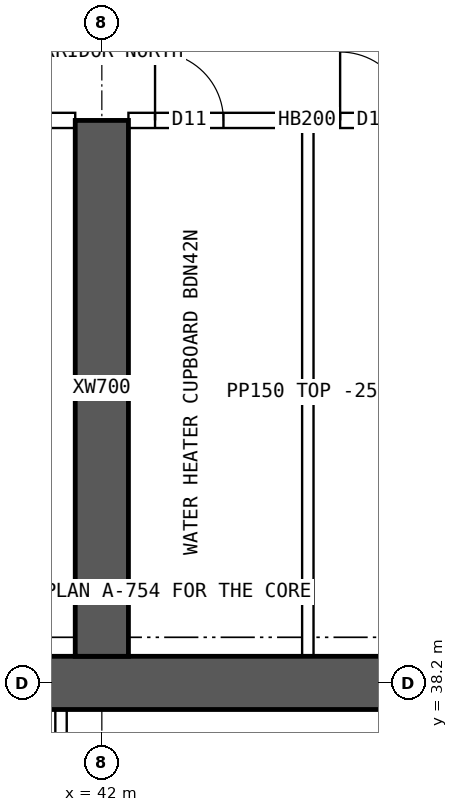
"""IFC4 building model, lengths in metres.
Left out: names, types, materials, properties, quantities, classifications, styles, units other than length and angle.
Written with IfcOpenShell. Run it as: python <this file> out.ifc"""

import sys

from ifc_helpers import new_model, si_unit, direction, frame, frame_2d, origin, place, context, subcontext, project, spatial, rectangle, extrude, element, fill, save


model = new_model("IFC4")
c1 = context("Model", 3, precision=1e-05, world=origin(), true_north=direction((0.0, 1.0)))
c2 = subcontext(c1, "Body", "Model", "MODEL_VIEW")
j1 = project(units=[si_unit("LENGTHUNIT", "METRE"), si_unit("PLANEANGLEUNIT", "RADIAN")], contexts=[c1])
p1 = place(None, origin())
s1 = spatial("IfcSite", under=j1, at=p1, CompositionType="ELEMENT")
p2 = place(p1, origin())
s2 = spatial("IfcBuilding", under=s1, at=p2, CompositionType="ELEMENT")
p3 = place(p2, frame((0.0, 0.0, 208.3)))
s3 = spatial("IfcBuildingStorey", under=s2, at=p3, CompositionType="ELEMENT", Elevation=208.3)
p4 = place(p3, frame((18.0, 38.2, 0.0), z_axis=(0.0, 0.0, 1.0), x_axis=(1.0, 0.0, 0.0)))
e1 = element("IfcWall", 1, at=p4, inside=s3, PredefinedType="SHEAR", context=c2, shape_type="SweptSolid", body=[
    extrude(rectangle(XDim=48.0, YDim=0.7, at=frame_2d((24.0, 0.0))), origin(), (0.0, 0.0, 1.0), 4.5),
])
p5 = place(p3, frame((42.0, 38.55, 0.0), z_axis=(0.0, 0.0, 1.0), x_axis=(0.0, 1.0, 0.0)))
e2 = element("IfcWall", 2, at=p5, inside=s3, PredefinedType="SHEAR", context=c2, shape_type="SweptSolid", body=[
    extrude(rectangle(XDim=7.05, YDim=0.7, at=frame_2d((3.525, 0.0))), origin(), (0.0, 0.0, 1.0), 4.5),
])
p6 = place(p3, frame((41.463, 34.75, 0.0), z_axis=(0.0, 0.0, 1.0), x_axis=(0.0, 1.0, 0.0)))
e3 = element("IfcWall", 3, at=p6, inside=s3, PredefinedType="SOLIDWALL", context=c2, shape_type="SweptSolid", body=[
    extrude(rectangle(XDim=3.1, YDim=0.15, at=frame_2d((1.55, 0.0))), origin(), (0.0, 0.0, 1.0), 4.25),
])
p7 = place(p3, frame((36.35, 45.6, 0.0), z_axis=(0.0, 0.0, 1.0), x_axis=(1.0, 0.0, 0.0)))
e4 = element("IfcWall", 4, at=p7, inside=s3, PredefinedType="SOLIDWALL", context=c2, shape_type="SweptSolid", body=[
    extrude(rectangle(XDim=5.3, YDim=0.2, at=frame_2d((2.65, 0.0))), origin(), (0.0, 0.0, 1.0), 4.25),
])
p8 = place(p7, frame((0.525, 0.0, 0.0)))
e5 = element("IfcOpeningElement", 5, at=p8, cuts=e4, PredefinedType="OPENING", context=c2, shape_type="SweptSolid", body=[
    extrude(rectangle(XDim=1.0, YDim=2.1, at=frame_2d((0.5, 1.05))), frame((0.0, 0.11, 0.0), z_axis=(0.0, -1.0, 0.0), x_axis=(1.0, 0.0, 0.0)), (0.0, 0.0, 1.0), 0.22),
])
p9 = place(p3, frame((42.35, 45.6, 0.0), z_axis=(0.0, 0.0, 1.0), x_axis=(1.0, 0.0, 0.0)))
e6 = element("IfcWall", 6, at=p9, inside=s3, PredefinedType="SOLIDWALL", context=c2, shape_type="SweptSolid", body=[
    extrude(rectangle(XDim=5.3, YDim=0.2, at=frame_2d((2.65, 0.0))), origin(), (0.0, 0.0, 1.0), 4.25),
])
p10 = place(p9, frame((0.35, 0.0, 0.0)))
e7 = element("IfcOpeningElement", 7, at=p10, cuts=e6, PredefinedType="OPENING", context=c2, shape_type="SweptSolid", body=[
    extrude(rectangle(XDim=0.9, YDim=2.1, at=frame_2d((0.45, 1.05))), frame((0.0, 0.11, 0.0), z_axis=(0.0, -1.0, 0.0), x_axis=(1.0, 0.0, 0.0)), (0.0, 0.0, 1.0), 0.22),
])
p11 = place(p9, frame((2.785, 0.0, 0.0)))
e8 = element("IfcOpeningElement", 8, at=p11, cuts=e6, PredefinedType="OPENING", context=c2, shape_type="SweptSolid", body=[
    extrude(rectangle(XDim=0.9, YDim=2.1, at=frame_2d((0.45, 1.05))), frame((0.0, 0.11, 0.0), z_axis=(0.0, -1.0, 0.0), x_axis=(1.0, 0.0, 0.0)), (0.0, 0.0, 1.0), 0.22),
])
p12 = place(p3, frame((44.71, 38.55, 0.0), z_axis=(0.0, 0.0, 1.0), x_axis=(0.0, 1.0, 0.0)))
e9 = element("IfcWall", 9, at=p12, inside=s3, PredefinedType="PARTITIONING", context=c2, shape_type="SweptSolid", body=[
    extrude(rectangle(XDim=6.95, YDim=0.15, at=frame_2d((3.475, 0.0))), origin(), (0.0, 0.0, 1.0), 4.25),
])
p13 = place(p10, origin())
e10 = element("IfcDoor", 10, at=p13, inside=s3, OperationType="SINGLE_SWING_LEFT", PredefinedType="DOOR", context=c2, shape_type="SweptSolid", body=[
    extrude(rectangle(XDim=0.9, YDim=2.1, at=frame_2d((0.45, 1.05))), frame((0.0, 0.025, 0.0), z_axis=(0.0, -1.0, 0.0), x_axis=(1.0, 0.0, 0.0)), (0.0, 0.0, 1.0), 0.05),
])
fill(e7, e10)
p14 = place(p11, origin())
e11 = element("IfcDoor", 11, at=p14, inside=s3, OperationType="SINGLE_SWING_LEFT", PredefinedType="DOOR", context=c2, shape_type="SweptSolid", body=[
    extrude(rectangle(XDim=0.9, YDim=2.1, at=frame_2d((0.45, 1.05))), frame((0.0, 0.025, 0.0), z_axis=(0.0, -1.0, 0.0), x_axis=(1.0, 0.0, 0.0)), (0.0, 0.0, 1.0), 0.05),
])
fill(e8, e11)
save(model, sys.argv[1])
